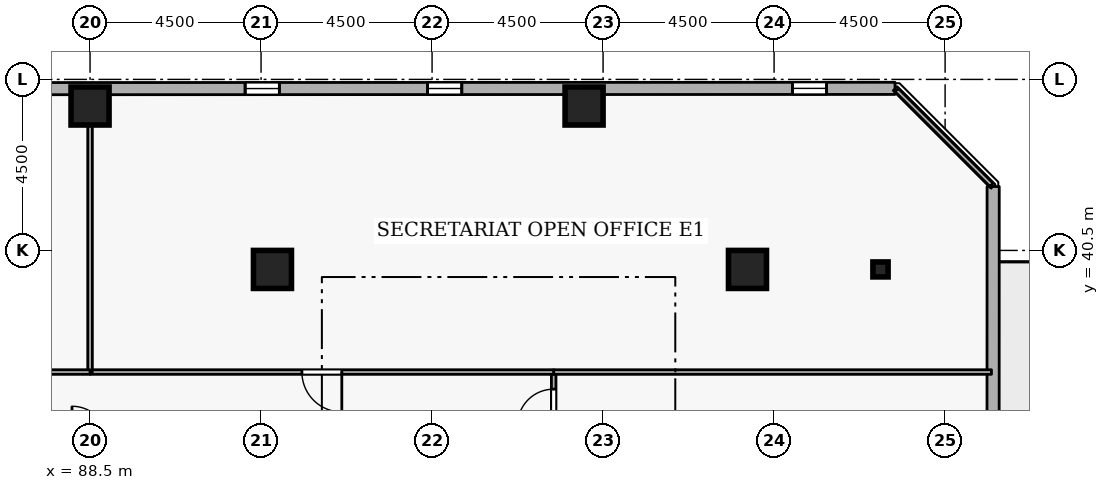
"""IFC4 building model, lengths in metres.
Left out: names, types, materials, properties, quantities, classifications, styles, units other than length and angle.
Written with IfcOpenShell. Run it as: python <this file> out.ifc"""

import sys

from ifc_helpers import new_model, si_unit, direction, frame, frame_2d, origin, origin_2d, place, context, subcontext, project, spatial, rectangle, i_section, extrude, element, fill, save


model = new_model("IFC4")
c1 = context("Model", 3, precision=1e-05, world=origin(), true_north=direction((0.0, 1.0)))
c2 = subcontext(c1, "Body", "Model", "MODEL_VIEW")
j1 = project(units=[si_unit("LENGTHUNIT", "METRE"), si_unit("PLANEANGLEUNIT", "RADIAN")], contexts=[c1])
p1 = place(None, origin())
s1 = spatial("IfcSite", under=j1, at=p1, CompositionType="ELEMENT")
p2 = place(p1, origin())
s2 = spatial("IfcBuilding", under=s1, at=p2, CompositionType="ELEMENT")
p3 = place(p2, frame((0.0, 0.0, 233.1)))
s3 = spatial("IfcBuildingStorey", under=s2, at=p3, CompositionType="ELEMENT", Elevation=233.1)
for number, where, z_axis, x_axis in (
    (1, (105.8, 40.0, 0.0), (0.0, 0.0, 1.0), (1.0, 0.0, 0.0)),
    (2, (101.5, 44.3, 0.0), (0.0, 0.0, 1.0), (1.0, 0.0, 0.0)),
    (3, (88.5, 44.3, 0.0), (0.0, 0.0, 1.0), (1.0, 0.0, 0.0)),
    (4, (93.3, 40.0, 0.0), (0.0, 0.0, 1.0), (1.0, 0.0, 0.0)),
):
    element("IfcColumn", number, at=place(p3, frame(where, z_axis=z_axis, x_axis=x_axis)), inside=s3, PredefinedType="COLUMN", context=c2, shape_type="SweptSolid", body=[
        extrude(rectangle(XDim=1.0, YDim=1.0, at=origin_2d()), origin(), (0.0, 0.0, 1.0), 3.6),
    ])
p4 = place(p3, frame((109.3, 40.0, 0.0), z_axis=(0.0, 0.0, 1.0), x_axis=(1.0, 0.0, 0.0)))
e5 = element("IfcColumn", 5, at=p4, inside=s3, PredefinedType="COLUMN", context=c2, shape_type="SweptSolid", body=[
    extrude(i_section(OverallWidth=0.399, OverallDepth=0.394, WebThickness=0.023, FlangeThickness=0.037, FilletRadius=0.015, at=origin_2d()), origin(), (0.0, 0.0, 1.0), 3.6),
])
p5 = place(p3, frame((112.254, 9.128, 0.0), z_axis=(0.0, 0.0, 1.0), x_axis=(0.000332378036, 0.999999944762, 0.0)))
e6 = element("IfcWall", 6, at=p5, inside=s3, PredefinedType="STANDARD", context=c2, shape_type="SweptSolid", body=[
    extrude(rectangle(XDim=33.054, YDim=0.32, at=frame_2d((16.527, 0.0))), origin(), (0.0, 0.0, 1.0), 2.7),
])
p6 = place(p5, frame((25.977, 0.0, 0.0)))
e7 = element("IfcOpeningElement", 7, at=p6, cuts=e6, PredefinedType="OPENING", context=c2, shape_type="SweptSolid", body=[
    extrude(rectangle(XDim=1.0, YDim=2.08, at=frame_2d((0.5, 1.04))), frame((0.0, 0.17, 0.0), z_axis=(0.0, -1.0, 0.0), x_axis=(1.0, 0.0, 0.0)), (0.0, 0.0, 1.0), 0.34),
])
p7 = place(p5, frame((1.8, 0.0, 0.72)))
e8 = element("IfcOpeningElement", 8, at=p7, cuts=e6, PredefinedType="OPENING", context=c2, shape_type="SweptSolid", body=[
    extrude(rectangle(XDim=0.9, YDim=1.75, at=frame_2d((0.45, 0.875))), frame((0.0, 0.17, 0.0), z_axis=(0.0, -1.0, 0.0), x_axis=(1.0, 0.0, 0.0)), (0.0, 0.0, 1.0), 0.34),
])
p8 = place(p5, frame((11.4, 0.0, 0.72)))
e9 = element("IfcOpeningElement", 9, at=p8, cuts=e6, PredefinedType="OPENING", context=c2, shape_type="SweptSolid", body=[
    extrude(rectangle(XDim=0.9, YDim=1.75, at=frame_2d((0.45, 0.875))), frame((0.0, 0.17, 0.0), z_axis=(0.0, -1.0, 0.0), x_axis=(1.0, 0.0, 0.0)), (0.0, 0.0, 1.0), 0.34),
])
p9 = place(p5, frame((16.2, 0.0, 0.72)))
e10 = element("IfcOpeningElement", 10, at=p9, cuts=e6, PredefinedType="OPENING", context=c2, shape_type="SweptSolid", body=[
    extrude(rectangle(XDim=0.9, YDim=1.75, at=frame_2d((0.45, 0.875))), frame((0.0, 0.17, 0.0), z_axis=(0.0, -1.0, 0.0), x_axis=(1.0, 0.0, 0.0)), (0.0, 0.0, 1.0), 0.34),
])
p10 = place(p5, frame((21.0, 0.0, 0.72)))
e11 = element("IfcOpeningElement", 11, at=p10, cuts=e6, PredefinedType="OPENING", context=c2, shape_type="SweptSolid", body=[
    extrude(rectangle(XDim=0.9, YDim=1.75, at=frame_2d((0.45, 0.875))), frame((0.0, 0.17, 0.0), z_axis=(0.0, -1.0, 0.0), x_axis=(1.0, 0.0, 0.0)), (0.0, 0.0, 1.0), 0.34),
])
p11 = place(p3, frame((109.681, 44.765, 0.0), z_axis=(0.0, 0.0, 1.0), x_axis=(-0.999999944762, -0.000332378036, 0.0)))
e12 = element("IfcWall", 12, at=p11, inside=s3, PredefinedType="STANDARD", context=c2, shape_type="SweptSolid", body=[
    extrude(rectangle(XDim=33.054, YDim=0.32, at=frame_2d((16.527, 0.0))), origin(), (0.0, 0.0, 1.0), 2.7),
])
p12 = place(p11, frame((1.8, 0.0, 0.72)))
e13 = element("IfcOpeningElement", 13, at=p12, cuts=e12, PredefinedType="OPENING", context=c2, shape_type="SweptSolid", body=[
    extrude(rectangle(XDim=0.9, YDim=1.75, at=frame_2d((0.45, 0.875))), frame((0.0, 0.17, 0.0), z_axis=(0.0, -1.0, 0.0), x_axis=(1.0, 0.0, 0.0)), (0.0, 0.0, 1.0), 0.34),
])
p13 = place(p11, frame((11.4, 0.0, 0.72)))
e14 = element("IfcOpeningElement", 14, at=p13, cuts=e12, PredefinedType="OPENING", context=c2, shape_type="SweptSolid", body=[
    extrude(rectangle(XDim=0.9, YDim=1.75, at=frame_2d((0.45, 0.875))), frame((0.0, 0.17, 0.0), z_axis=(0.0, -1.0, 0.0), x_axis=(1.0, 0.0, 0.0)), (0.0, 0.0, 1.0), 0.34),
])
p14 = place(p11, frame((16.2, 0.0, 0.72)))
e15 = element("IfcOpeningElement", 15, at=p14, cuts=e12, PredefinedType="OPENING", context=c2, shape_type="SweptSolid", body=[
    extrude(rectangle(XDim=0.9, YDim=1.75, at=frame_2d((0.45, 0.875))), frame((0.0, 0.17, 0.0), z_axis=(0.0, -1.0, 0.0), x_axis=(1.0, 0.0, 0.0)), (0.0, 0.0, 1.0), 0.34),
])
p15 = place(p11, frame((25.8, 0.0, 0.72)))
e16 = element("IfcOpeningElement", 16, at=p15, cuts=e12, PredefinedType="OPENING", context=c2, shape_type="SweptSolid", body=[
    extrude(rectangle(XDim=0.9, YDim=1.75, at=frame_2d((0.45, 0.875))), frame((0.0, 0.17, 0.0), z_axis=(0.0, -1.0, 0.0), x_axis=(1.0, 0.0, 0.0)), (0.0, 0.0, 1.0), 0.34),
])
p16 = place(p3, frame((100.7, 35.45, 0.0), z_axis=(0.0, 0.0, 1.0), x_axis=(0.0, 1.0, 0.0)))
e17 = element("IfcWall", 17, at=p16, inside=s3, PredefinedType="PARTITIONING", context=c2, shape_type="SweptSolid", body=[
    extrude(rectangle(XDim=1.85, YDim=0.12, at=frame_2d((0.925, 0.0))), origin(), (0.0, 0.0, 1.0), 3.34),
])
p17 = place(p16, frame((0.45, 0.0, 0.0)))
e18 = element("IfcOpeningElement", 18, at=p17, cuts=e17, PredefinedType="OPENING", context=c2, shape_type="SweptSolid", body=[
    extrude(rectangle(XDim=0.95, YDim=2.1, at=frame_2d((0.475, 1.05))), frame((0.0, 0.07, 0.0), z_axis=(0.0, -1.0, 0.0), x_axis=(1.0, 0.0, 0.0)), (0.0, 0.0, 1.0), 0.14),
])
p18 = place(p3, frame((100.7, 37.3, 0.0), z_axis=(0.0, 0.0, 1.0), x_axis=(1.0, 0.0, 0.0)))
e19 = element("IfcWall", 19, at=p18, inside=s3, PredefinedType="PARTITIONING", context=c2, shape_type="SweptSolid", body=[
    extrude(rectangle(XDim=11.52, YDim=0.12, at=frame_2d((5.76, 0.0))), origin(), (0.0, 0.0, 1.0), 3.34),
])
p19 = place(p3, frame((100.7, 37.3, 0.0), z_axis=(0.0, 0.0, 1.0), x_axis=(-1.0, 0.0, 0.0)))
e20 = element("IfcWall", 20, at=p19, inside=s3, PredefinedType="PARTITIONING", context=c2, shape_type="SweptSolid", body=[
    extrude(rectangle(XDim=12.2, YDim=0.12, at=frame_2d((6.1, 0.0))), origin(), (0.0, 0.0, 1.0), 3.34),
])
p20 = place(p19, frame((5.575, 0.0, 0.0)))
e21 = element("IfcOpeningElement", 21, at=p20, cuts=e20, PredefinedType="OPENING", context=c2, shape_type="SweptSolid", body=[
    extrude(rectangle(XDim=1.05, YDim=2.1, at=frame_2d((0.525, 1.05))), frame((0.0, 0.07, 0.0), z_axis=(0.0, -1.0, 0.0), x_axis=(1.0, 0.0, 0.0)), (0.0, 0.0, 1.0), 0.14),
])
p21 = place(p3, frame((88.5, 37.3, 0.0), z_axis=(0.0, 0.0, 1.0), x_axis=(0.0, 1.0, 0.0)))
e22 = element("IfcWall", 22, at=p21, inside=s3, PredefinedType="PARTITIONING", context=c2, shape_type="SweptSolid", body=[
    extrude(rectangle(XDim=7.42, YDim=0.12, at=frame_2d((3.71, 0.0))), origin(), (0.0, 0.0, 1.0), 2.932),
])
p22 = place(p3, frame((109.725, 44.72, 0.0), z_axis=(0.0, 0.0, 1.0), x_axis=(0.707106781187, -0.707106781187, 0.0)))
e23 = element("IfcWall", 23, at=p22, inside=s3, PredefinedType="PARTITIONING", context=c2, shape_type="SweptSolid", body=[
    extrude(rectangle(XDim=3.528, YDim=0.12, at=frame_2d((1.764, 0.0))), origin(), (0.0, 0.0, 1.0), 3.34),
])
p23 = place(p3, frame((88.5, 37.3, 0.0), z_axis=(0.0, 0.0, 1.0), x_axis=(-1.0, 0.0, 0.0)))
e24 = element("IfcWall", 24, at=p23, inside=s3, PredefinedType="PARTITIONING", context=c2, shape_type="SweptSolid", body=[
    extrude(rectangle(XDim=6.3, YDim=0.12, at=frame_2d((3.15, 0.0))), origin(), (0.0, 0.0, 1.0), 3.34),
])
p24 = place(p23, frame((2.625, 0.0, 0.0)))
e25 = element("IfcOpeningElement", 25, at=p24, cuts=e24, PredefinedType="OPENING", context=c2, shape_type="SweptSolid", body=[
    extrude(rectangle(XDim=1.05, YDim=2.1, at=frame_2d((0.525, 1.05))), frame((0.0, 0.07, 0.0), z_axis=(0.0, -1.0, 0.0), x_axis=(1.0, 0.0, 0.0)), (0.0, 0.0, 1.0), 0.14),
])
p25 = place(p12, origin())
e26 = element("IfcWindow", 26, at=p25, inside=s3, PartitioningType="SINGLE_PANEL", PredefinedType="WINDOW", context=c2, shape_type="SweptSolid", body=[
    extrude(rectangle(XDim=0.9, YDim=1.75, at=frame_2d((0.45, 0.875))), frame((0.0, 0.03, 0.0), z_axis=(0.0, -1.0, 0.0), x_axis=(1.0, 0.0, 0.0)), (0.0, 0.0, 1.0), 0.06),
])
fill(e13, e26)
p26 = place(p13, origin())
e27 = element("IfcWindow", 27, at=p26, inside=s3, PartitioningType="SINGLE_PANEL", PredefinedType="WINDOW", context=c2, shape_type="SweptSolid", body=[
    extrude(rectangle(XDim=0.9, YDim=1.75, at=frame_2d((0.45, 0.875))), frame((0.0, 0.03, 0.0), z_axis=(0.0, -1.0, 0.0), x_axis=(1.0, 0.0, 0.0)), (0.0, 0.0, 1.0), 0.06),
])
fill(e14, e27)
p27 = place(p14, origin())
e28 = element("IfcWindow", 28, at=p27, inside=s3, PartitioningType="SINGLE_PANEL", PredefinedType="WINDOW", context=c2, shape_type="SweptSolid", body=[
    extrude(rectangle(XDim=0.9, YDim=1.75, at=frame_2d((0.45, 0.875))), frame((0.0, 0.03, 0.0), z_axis=(0.0, -1.0, 0.0), x_axis=(1.0, 0.0, 0.0)), (0.0, 0.0, 1.0), 0.06),
])
fill(e15, e28)
p28 = place(p17, origin())
e29 = element("IfcDoor", 29, at=p28, inside=s3, OperationType="SINGLE_SWING_LEFT", PredefinedType="DOOR", context=c2, shape_type="SweptSolid", body=[
    extrude(rectangle(XDim=0.95, YDim=2.1, at=frame_2d((0.475, 1.05))), frame((0.0, 0.025, 0.0), z_axis=(0.0, -1.0, 0.0), x_axis=(1.0, 0.0, 0.0)), (0.0, 0.0, 1.0), 0.05),
])
fill(e18, e29)
p29 = place(p20, origin())
e30 = element("IfcDoor", 30, at=p29, inside=s3, OperationType="SINGLE_SWING_LEFT", PredefinedType="DOOR", context=c2, shape_type="SweptSolid", body=[
    extrude(rectangle(XDim=1.05, YDim=2.1, at=frame_2d((0.525, 1.05))), frame((0.0, 0.025, 0.0), z_axis=(0.0, -1.0, 0.0), x_axis=(1.0, 0.0, 0.0)), (0.0, 0.0, 1.0), 0.05),
])
fill(e21, e30)
save(model, sys.argv[1])
